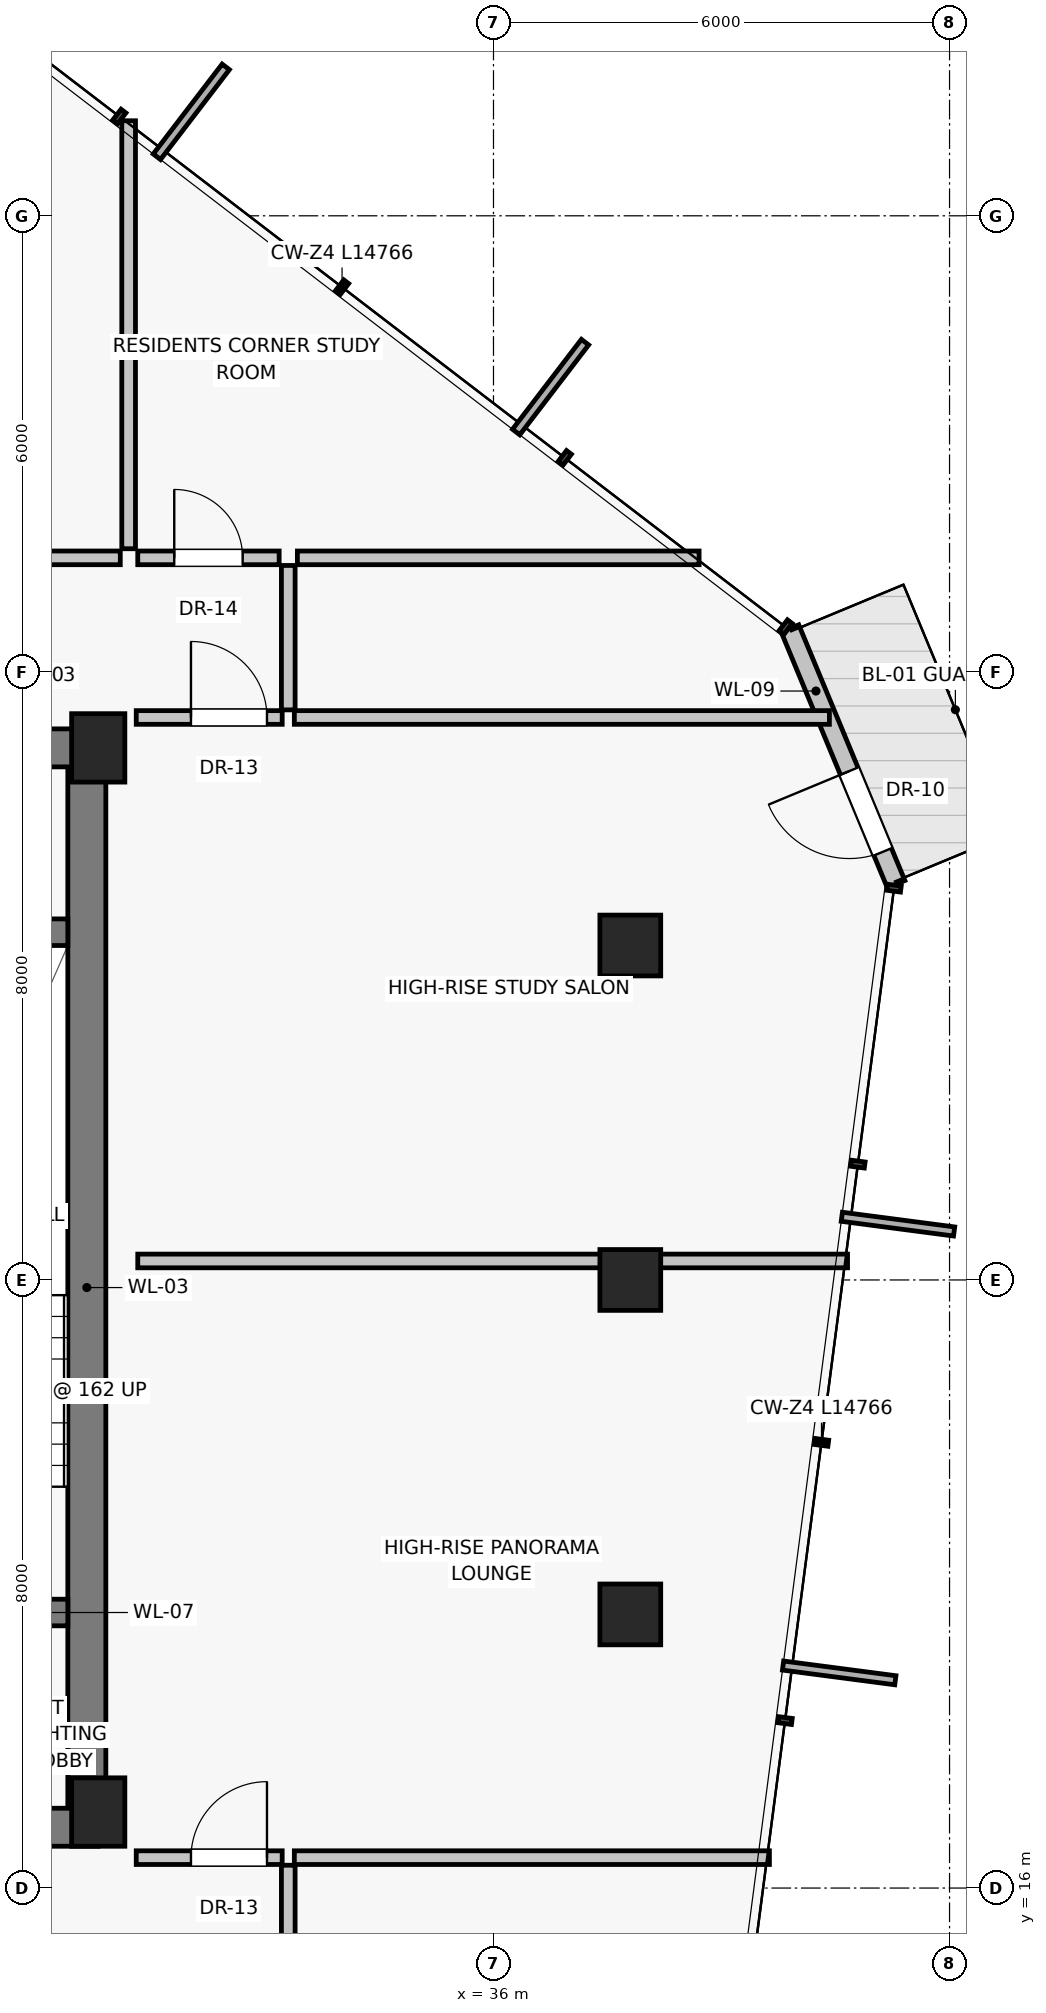
"""IFC4 building model, lengths in metres.
Left out: names, types, materials, properties, quantities, classifications, styles, units other than length and angle.
Written with IfcOpenShell. Run it as: python <this file> out.ifc"""

import sys

from ifc_helpers import new_model, si_unit, direction, frame, frame_2d, origin, origin_2d, place, context, subcontext, project, spatial, rectangle, extrude, source, transform, mapped, element, fill, save


model = new_model("IFC4")
c1 = context("Model", 3, precision=1e-05, world=origin(), true_north=direction((0.0, 1.0)))
c2 = subcontext(c1, "Body", "Model", "MODEL_VIEW")
j1 = project(units=[si_unit("LENGTHUNIT", "METRE"), si_unit("PLANEANGLEUNIT", "RADIAN")], contexts=[c1])
p1 = place(None, origin())
s1 = spatial("IfcSite", under=j1, at=p1, CompositionType="ELEMENT")
p2 = place(p1, origin())
s2 = spatial("IfcBuilding", under=s1, at=p2, CompositionType="ELEMENT")
p3 = place(p2, frame((0.0, 0.0, 233.3)))
s3 = spatial("IfcBuildingStorey", under=s2, at=p3, CompositionType="ELEMENT", Elevation=233.3)
for number, where, z_axis, x_axis in (
    (1, (30.8, 17.0, 0.0), (0.0, 0.0, 1.0), (1.0, 0.0, 0.0)),
    (2, (30.8, 31.0, 0.0), (0.0, 0.0, 1.0), (1.0, 0.0, 0.0)),
):
    element("IfcColumn", number, at=place(p3, frame(where, z_axis=z_axis, x_axis=x_axis)), inside=s3, PredefinedType="PILASTER", context=c2, shape_type="SweptSolid", body=[
        extrude(rectangle(XDim=0.7, YDim=0.9, at=origin_2d()), origin(), (0.0, 0.0, 1.0), 3.25),
    ])
for number, where, z_axis, x_axis in (
    (3, (37.8, 19.6, 0.0), (0.0, 0.0, 1.0), (1.0, 0.0, 0.0)),
    (4, (37.8, 24.0, 0.0), (0.0, 0.0, 1.0), (1.0, 0.0, 0.0)),
    (5, (37.8, 28.4, 0.0), (0.0, 0.0, 1.0), (1.0, 0.0, 0.0)),
):
    element("IfcColumn", number, at=place(p3, frame(where, z_axis=z_axis, x_axis=x_axis)), inside=s3, PredefinedType="COLUMN", context=c2, shape_type="SweptSolid", body=[
        extrude(rectangle(XDim=0.8, YDim=0.8, at=origin_2d()), origin(), (0.0, 0.0, 1.0), 3.25),
    ])
p4 = place(p3, frame((41.297, 29.207, 0.0), z_axis=(0.0, 0.0, 1.0), x_axis=(-0.383320496462, 0.923615394519, 0.0)))
e6 = element("IfcWall", 6, at=p4, inside=s3, PredefinedType="SOLIDWALL", context=c2, shape_type="SweptSolid", body=[
    extrude(rectangle(XDim=3.643, YDim=0.25, at=frame_2d((1.821, 0.0))), origin(), (0.0, 0.0, 1.0), 3.015),
])
p5 = place(p4, frame((0.46, 0.0, 0.0)))
e7 = element("IfcOpeningElement", 7, at=p5, cuts=e6, PredefinedType="OPENING", context=c2, shape_type="SweptSolid", body=[
    extrude(rectangle(XDim=1.15, YDim=2.25, at=frame_2d((0.575, 1.125))), frame((0.0, 0.135, 0.0), z_axis=(0.0, -1.0, 0.0), x_axis=(1.0, 0.0, 0.0)), (0.0, 0.0, 1.0), 0.27),
])
p6 = place(p3, frame((30.65, 16.8, 0.0), z_axis=(0.0, 0.0, 1.0), x_axis=(0.0, 1.0, 0.0)))
e8 = element("IfcWall", 8, at=p6, inside=s3, PredefinedType="SHEAR", context=c2, shape_type="SweptSolid", body=[
    extrude(rectangle(XDim=14.2, YDim=0.5, at=frame_2d((7.1, 0.0))), origin(), (0.0, 0.0, 1.0), 3.015),
])
p7 = place(p3, frame((24.95, 16.8, 0.0), z_axis=(0.0, 0.0, 1.0), x_axis=(1.0, 0.0, 0.0)))
e9 = element("IfcWall", 9, at=p7, inside=s3, PredefinedType="SHEAR", context=c2, shape_type="SweptSolid", body=[
    extrude(rectangle(XDim=5.85, YDim=0.5, at=frame_2d((2.925, 0.0))), origin(), (0.0, 0.0, 1.0), 3.015),
])
p8 = place(p7, frame((2.15, 0.0, 0.0)))
e10 = element("IfcOpeningElement", 10, at=p8, cuts=e9, PredefinedType="OPENING", context=c2, shape_type="SweptSolid", body=[
    extrude(rectangle(XDim=1.2, YDim=2.03, at=frame_2d((0.6, 1.015))), frame((0.0, 0.26, 0.0), z_axis=(0.0, -1.0, 0.0), x_axis=(1.0, 0.0, 0.0)), (0.0, 0.0, 1.0), 0.52),
])
p9 = place(p3, frame((27.0, 31.0, 0.0), z_axis=(0.0, 0.0, 1.0), x_axis=(1.0, 0.0, 0.0)))
e11 = element("IfcWall", 11, at=p9, inside=s3, PredefinedType="SHEAR", context=c2, shape_type="SweptSolid", body=[
    extrude(rectangle(XDim=3.8, YDim=0.5, at=frame_2d((1.9, 0.0))), origin(), (0.0, 0.0, 1.0), 3.015),
])
p10 = place(p9, frame((1.15, 0.0, 0.0)))
e12 = element("IfcOpeningElement", 12, at=p10, cuts=e11, PredefinedType="OPENING", context=c2, shape_type="SweptSolid", body=[
    extrude(rectangle(XDim=1.0, YDim=2.01, at=frame_2d((0.5, 1.005))), frame((0.0, 0.26, 0.0), z_axis=(0.0, -1.0, 0.0), x_axis=(1.0, 0.0, 0.0)), (0.0, 0.0, 1.0), 0.52),
])
p11 = place(p3, frame((27.025, 19.625, 0.0), z_axis=(0.0, 0.0, 1.0), x_axis=(1.0, 0.0, 0.0)))
e13 = element("IfcWall", 13, at=p11, inside=s3, PredefinedType="SHEAR", context=c2, shape_type="SweptSolid", body=[
    extrude(rectangle(XDim=3.375, YDim=0.35, at=frame_2d((1.688, 0.0))), origin(), (0.0, 0.0, 1.0), 3.015),
])
p12 = place(p11, frame((1.05, 0.0, 0.0)))
e14 = element("IfcOpeningElement", 14, at=p12, cuts=e13, PredefinedType="OPENING", context=c2, shape_type="SweptSolid", body=[
    extrude(rectangle(XDim=1.1, YDim=2.03, at=frame_2d((0.55, 1.015))), frame((0.0, 0.185, 0.0), z_axis=(0.0, -1.0, 0.0), x_axis=(1.0, 0.0, 0.0)), (0.0, 0.0, 1.0), 0.37),
])
p13 = place(p3, frame((27.025, 28.575, 0.0), z_axis=(0.0, 0.0, 1.0), x_axis=(1.0, 0.0, 0.0)))
e15 = element("IfcWall", 15, at=p13, inside=s3, PredefinedType="SHEAR", context=c2, shape_type="SweptSolid", body=[
    extrude(rectangle(XDim=3.375, YDim=0.35, at=frame_2d((1.688, 0.0))), origin(), (0.0, 0.0, 1.0), 3.015),
])
p14 = place(p3, frame((31.2, 33.62, 0.0), z_axis=(0.0, 0.0, 1.0), x_axis=(0.0, 1.0, 0.0)))
e16 = element("IfcWall", 16, at=p14, inside=s3, PredefinedType="PARTITIONING", context=c2, shape_type="SweptSolid", body=[
    extrude(rectangle(XDim=5.63, YDim=0.18, at=frame_2d((2.815, 0.0))), origin(), (0.0, 0.0, 1.0), 3.015),
])
p15 = place(p3, frame((24.93, 33.5, 0.0), z_axis=(0.0, 0.0, 1.0), x_axis=(1.0, 0.0, 0.0)))
e17 = element("IfcWall", 17, at=p15, inside=s3, PredefinedType="PARTITIONING", context=c2, shape_type="SweptSolid", body=[
    extrude(rectangle(XDim=6.16, YDim=0.18, at=frame_2d((3.08, 0.0))), origin(), (0.0, 0.0, 1.0), 3.015),
])
p16 = place(p15, frame((3.76, 0.0, 0.0)))
e18 = element("IfcOpeningElement", 18, at=p16, cuts=e17, PredefinedType="OPENING", context=c2, shape_type="SweptSolid", body=[
    extrude(rectangle(XDim=0.95, YDim=2.02, at=frame_2d((0.475, 1.01))), frame((0.0, 0.1, 0.0), z_axis=(0.0, -1.0, 0.0), x_axis=(1.0, 0.0, 0.0)), (0.0, 0.0, 1.0), 0.2),
])
p17 = place(p3, frame((31.32, 24.25, 0.0), z_axis=(0.0, 0.0, 1.0), x_axis=(1.0, 0.0, 0.0)))
e19 = element("IfcWall", 19, at=p17, inside=s3, PredefinedType="PARTITIONING", context=c2, shape_type="SweptSolid", body=[
    extrude(rectangle(XDim=9.338, YDim=0.18, at=frame_2d((4.669, 0.0))), origin(), (0.0, 0.0, 1.0), 3.015),
])
p18 = place(p3, frame((33.3, 14.4, 0.0), z_axis=(0.0, 0.0, 1.0), x_axis=(0.0, 1.0, 0.0)))
e20 = element("IfcWall", 20, at=p18, inside=s3, PredefinedType="PARTITIONING", context=c2, shape_type="SweptSolid", body=[
    extrude(rectangle(XDim=1.9, YDim=0.18, at=frame_2d((0.95, 0.0))), origin(), (0.0, 0.0, 1.0), 3.015),
])
p19 = place(p3, frame((33.3, 31.5, 0.0), z_axis=(0.0, 0.0, 1.0), x_axis=(0.0, 1.0, 0.0)))
e21 = element("IfcWall", 21, at=p19, inside=s3, PredefinedType="PARTITIONING", context=c2, shape_type="SweptSolid", body=[
    extrude(rectangle(XDim=1.9, YDim=0.18, at=frame_2d((0.95, 0.0))), origin(), (0.0, 0.0, 1.0), 3.015),
])
p20 = place(p3, frame((31.3, 16.4, 0.0), z_axis=(0.0, 0.0, 1.0), x_axis=(1.0, 0.0, 0.0)))
e22 = element("IfcWall", 22, at=p20, inside=s3, PredefinedType="PARTITIONING", context=c2, shape_type="SweptSolid", body=[
    extrude(rectangle(XDim=1.92, YDim=0.18, at=frame_2d((0.96, 0.0))), origin(), (0.0, 0.0, 1.0), 3.015),
])
p21 = place(p20, frame((0.72, 0.0, 0.0)))
e23 = element("IfcOpeningElement", 23, at=p21, cuts=e22, PredefinedType="OPENING", context=c2, shape_type="SweptSolid", body=[
    extrude(rectangle(XDim=1.0, YDim=2.01, at=frame_2d((0.5, 1.005))), frame((0.0, 0.1, 0.0), z_axis=(0.0, -1.0, 0.0), x_axis=(1.0, 0.0, 0.0)), (0.0, 0.0, 1.0), 0.2),
])
p22 = place(p3, frame((33.38, 16.4, 0.0), z_axis=(0.0, 0.0, 1.0), x_axis=(1.0, 0.0, 0.0)))
e24 = element("IfcWall", 24, at=p22, inside=s3, PredefinedType="PARTITIONING", context=c2, shape_type="SweptSolid", body=[
    extrude(rectangle(XDim=6.25, YDim=0.18, at=frame_2d((3.125, 0.0))), origin(), (0.0, 0.0, 1.0), 3.015),
])
p23 = place(p3, frame((31.3, 31.4, 0.0), z_axis=(0.0, 0.0, 1.0), x_axis=(1.0, 0.0, 0.0)))
e25 = element("IfcWall", 25, at=p23, inside=s3, PredefinedType="PARTITIONING", context=c2, shape_type="SweptSolid", body=[
    extrude(rectangle(XDim=1.92, YDim=0.18, at=frame_2d((0.96, 0.0))), origin(), (0.0, 0.0, 1.0), 3.015),
])
p24 = place(p23, frame((0.72, 0.0, 0.0)))
e26 = element("IfcOpeningElement", 26, at=p24, cuts=e25, PredefinedType="OPENING", context=c2, shape_type="SweptSolid", body=[
    extrude(rectangle(XDim=1.0, YDim=2.01, at=frame_2d((0.5, 1.005))), frame((0.0, 0.1, 0.0), z_axis=(0.0, -1.0, 0.0), x_axis=(1.0, 0.0, 0.0)), (0.0, 0.0, 1.0), 0.2),
])
p25 = place(p3, frame((33.38, 31.4, 0.0), z_axis=(0.0, 0.0, 1.0), x_axis=(1.0, 0.0, 0.0)))
e27 = element("IfcWall", 27, at=p25, inside=s3, PredefinedType="PARTITIONING", context=c2, shape_type="SweptSolid", body=[
    extrude(rectangle(XDim=7.039, YDim=0.18, at=frame_2d((3.52, 0.0))), origin(), (0.0, 0.0, 1.0), 3.015),
])
p26 = place(p3, frame((33.42, 33.5, 0.0), z_axis=(0.0, 0.0, 1.0), x_axis=(1.0, 0.0, 0.0)))
e28 = element("IfcWall", 28, at=p26, inside=s3, PredefinedType="PARTITIONING", context=c2, shape_type="SweptSolid", body=[
    extrude(rectangle(XDim=5.285, YDim=0.18, at=frame_2d((2.643, 0.0))), origin(), (0.0, 0.0, 1.0), 3.015),
])
p27 = place(p3, frame((31.32, 33.5, 0.0), z_axis=(0.0, 0.0, 1.0), x_axis=(1.0, 0.0, 0.0)))
e29 = element("IfcWall", 29, at=p27, inside=s3, PredefinedType="PARTITIONING", context=c2, shape_type="SweptSolid", body=[
    extrude(rectangle(XDim=1.86, YDim=0.18, at=frame_2d((0.93, 0.0))), origin(), (0.0, 0.0, 1.0), 3.015),
])
p28 = place(p27, frame((0.48, 0.0, 0.0)))
e30 = element("IfcOpeningElement", 30, at=p28, cuts=e29, PredefinedType="OPENING", context=c2, shape_type="SweptSolid", body=[
    extrude(rectangle(XDim=0.9, YDim=2.01, at=frame_2d((0.45, 1.005))), frame((0.0, 0.1, 0.0), z_axis=(0.0, -1.0, 0.0), x_axis=(1.0, 0.0, 0.0)), (0.0, 0.0, 1.0), 0.2),
])
m1 = source(origin(), c2, "Body", "SweptSolid", [
    extrude(rectangle(XDim=1.15, YDim=2.25, at=frame_2d((0.575, 1.125))), frame((0.0, 0.025, 0.0), z_axis=(0.0, -1.0, 0.0), x_axis=(1.0, 0.0, 0.0)), (0.0, 0.0, 1.0), 0.05),
])
p29 = place(p5, frame((1.15, 0.0, 0.0), z_axis=(0.0, 0.0, 1.0), x_axis=(-1.0, 0.0, 0.0)))
e31 = element("IfcDoor", 31, at=p29, inside=s3, OperationType="SINGLE_SWING_RIGHT", PredefinedType="DOOR", context=c2, shape_type="MappedRepresentation", body=[
    mapped(m1, transform((0.0, 0.0, 0.0), scale=1.0)),
])
fill(e7, e31)
m2 = source(origin(), c2, "Body", "SweptSolid", [
    extrude(rectangle(XDim=1.0, YDim=2.01, at=frame_2d((0.5, 1.005))), frame((0.0, 0.025, 0.0), z_axis=(0.0, -1.0, 0.0), x_axis=(1.0, 0.0, 0.0)), (0.0, 0.0, 1.0), 0.05),
])
p30 = place(p21, origin())
e32 = element("IfcDoor", 32, at=p30, inside=s3, OperationType="SINGLE_SWING_RIGHT", PredefinedType="DOOR", context=c2, shape_type="MappedRepresentation", body=[
    mapped(m2, transform((0.0, 0.0, 0.0), scale=1.0)),
])
fill(e23, e32)
p31 = place(p24, origin())
e33 = element("IfcDoor", 33, at=p31, inside=s3, OperationType="SINGLE_SWING_LEFT", PredefinedType="DOOR", context=c2, shape_type="MappedRepresentation", body=[
    mapped(m2, transform((0.0, 0.0, 0.0), scale=1.0)),
])
fill(e26, e33)
m3 = source(origin(), c2, "Body", "SweptSolid", [
    extrude(rectangle(XDim=0.9, YDim=2.01, at=frame_2d((0.45, 1.005))), frame((0.0, 0.025, 0.0), z_axis=(0.0, -1.0, 0.0), x_axis=(1.0, 0.0, 0.0)), (0.0, 0.0, 1.0), 0.05),
])
p32 = place(p28, origin())
e34 = element("IfcDoor", 34, at=p32, inside=s3, OperationType="SINGLE_SWING_LEFT", PredefinedType="DOOR", context=c2, shape_type="MappedRepresentation", body=[
    mapped(m3, transform((0.0, 0.0, 0.0), scale=1.0)),
])
fill(e30, e34)
save(model, sys.argv[1])
